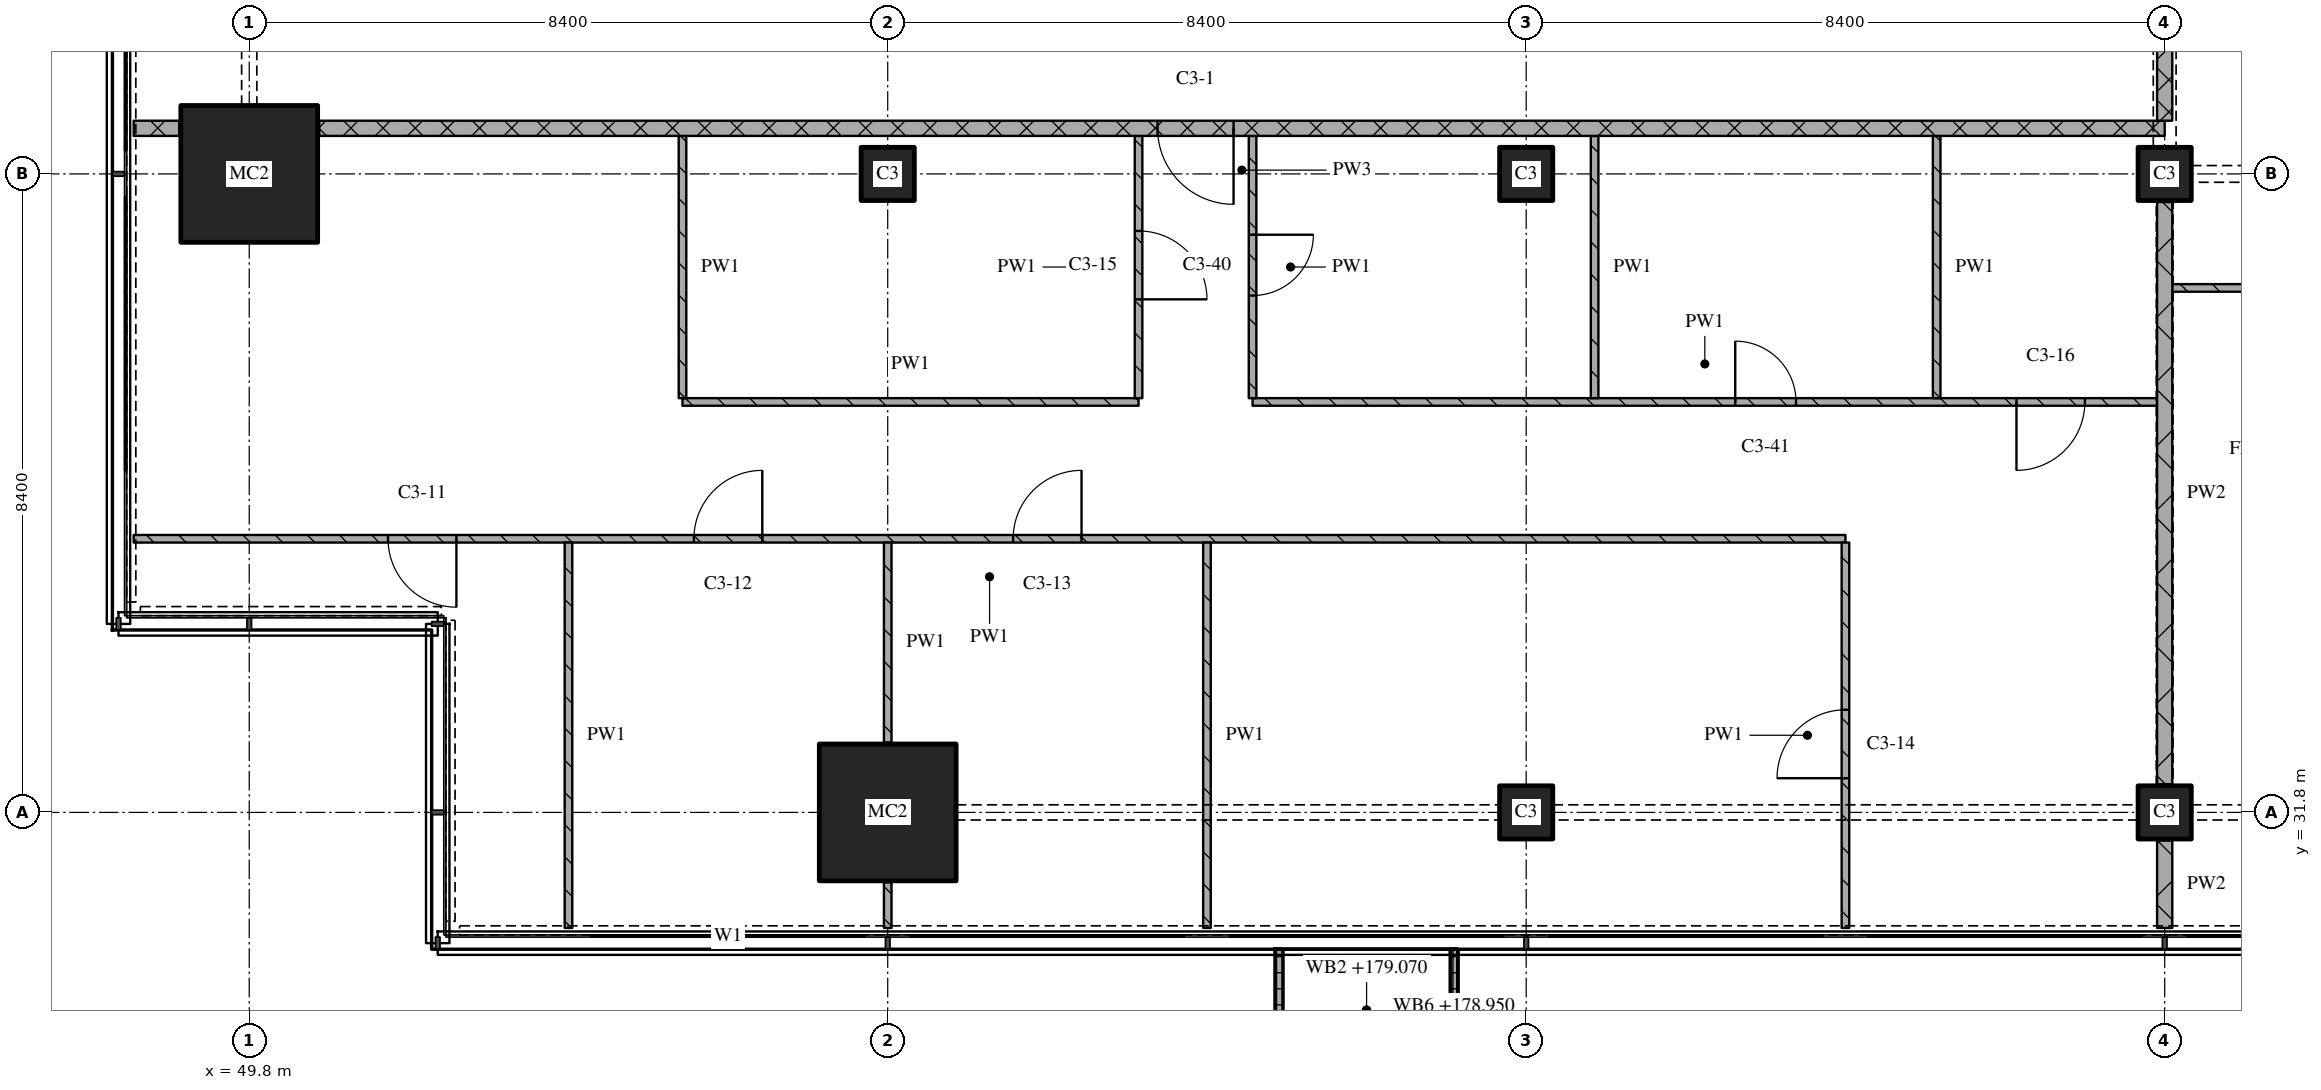
"""IFC4 building model, lengths in metres.
Left out: names, types, materials, properties, quantities, classifications, styles, units other than length and angle.
Written with IfcOpenShell. Run it as: python <this file> out.ifc"""

import sys

from ifc_helpers import new_model, si_unit, direction, frame, frame_2d, origin, origin_2d, place, context, subcontext, project, spatial, polyline, rectangle, outline, extrude, element, fill, save


model = new_model("IFC4")
c1 = context("Model", 3, precision=1e-05, world=origin(), true_north=direction((0.0, 1.0)))
c2 = subcontext(c1, "Body", "Model", "MODEL_VIEW")
j1 = project(units=[si_unit("LENGTHUNIT", "METRE"), si_unit("PLANEANGLEUNIT", "RADIAN")], contexts=[c1])
p1 = place(None, origin())
s1 = spatial("IfcSite", under=j1, at=p1, CompositionType="ELEMENT")
p2 = place(p1, origin())
s2 = spatial("IfcBuilding", under=s1, at=p2, CompositionType="ELEMENT")
p3 = place(p2, frame((0.0, 0.0, 176.25)))
s3 = spatial("IfcBuildingStorey", under=s2, at=p3, CompositionType="ELEMENT", Elevation=176.25)
for number, where, z_axis, x_axis in (
    (1, (49.8, 40.2, 0.0), (0.0, 0.0, 1.0), (1.0, 0.0, 0.0)),
    (2, (58.2, 31.8, 0.0), (0.0, 0.0, 1.0), (1.0, 0.0, 0.0)),
):
    element("IfcColumn", number, at=place(p3, frame(where, z_axis=z_axis, x_axis=x_axis)), inside=s3, PredefinedType="COLUMN", context=c2, shape_type="SweptSolid", body=[
        extrude(rectangle(XDim=1.8, YDim=1.8, at=origin_2d()), origin(), (0.0, 0.0, 1.0), 3.6),
    ])
for number, where, z_axis, x_axis in (
    (3, (58.2, 40.2, 0.0), (0.0, 0.0, 1.0), (1.0, 0.0, 0.0)),
    (4, (66.6, 31.8, 0.0), (0.0, 0.0, 1.0), (1.0, 0.0, 0.0)),
    (5, (66.6, 40.2, 0.0), (0.0, 0.0, 1.0), (1.0, 0.0, 0.0)),
    (6, (75.0, 31.8, 0.0), (0.0, 0.0, 1.0), (1.0, 0.0, 0.0)),
    (7, (75.0, 40.2, 0.0), (0.0, 0.0, 1.0), (1.0, 0.0, 0.0)),
):
    element("IfcColumn", number, at=place(p3, frame(where, z_axis=z_axis, x_axis=x_axis)), inside=s3, PredefinedType="COLUMN", context=c2, shape_type="SweptSolid", body=[
        extrude(rectangle(XDim=0.7, YDim=0.7, at=origin_2d()), origin(), (0.0, 0.0, 1.0), 3.6),
    ])
p4 = place(p3, origin())
e8 = element("IfcWall", 8, at=p4, inside=s3, PredefinedType="SOLIDWALL", context=c2, shape_type="SweptSolid", body=[
    extrude(outline(polyline([(63.3, 30.0), (63.4, 30.0), (63.4, 28.5), (65.6, 28.5), (65.6, 30.0), (65.7, 30.0), (65.7, 28.4), (63.3, 28.4), (63.3, 30.0)])), origin(), (0.0, 0.0, 1.0), 1.0),
])
p5 = place(p3, frame((70.8, 35.4, 0.0), z_axis=(0.0, 0.0, 1.0), x_axis=(-1.0, 0.0, 0.0)))
e9 = element("IfcWall", 9, at=p5, inside=s3, PredefinedType="PARTITIONING", context=c2, shape_type="SweptSolid", body=[
    extrude(rectangle(XDim=22.52, YDim=0.1, at=frame_2d((11.26, 0.0))), origin(), (0.0, 0.0, 1.0), 3.32),
])
p6 = place(p5, frame((10.05, 0.0, 0.0)))
e10 = element("IfcOpeningElement", 10, at=p6, cuts=e9, PredefinedType="OPENING", context=c2, shape_type="SweptSolid", body=[
    extrude(rectangle(XDim=0.9, YDim=2.1, at=frame_2d((0.45, 1.05))), frame((0.0, 0.06, 0.0), z_axis=(0.0, -1.0, 0.0), x_axis=(1.0, 0.0, 0.0)), (0.0, 0.0, 1.0), 0.12),
])
p7 = place(p5, frame((14.25, 0.0, 0.0)))
e11 = element("IfcOpeningElement", 11, at=p7, cuts=e9, PredefinedType="OPENING", context=c2, shape_type="SweptSolid", body=[
    extrude(rectangle(XDim=0.9, YDim=2.1, at=frame_2d((0.45, 1.05))), frame((0.0, 0.06, 0.0), z_axis=(0.0, -1.0, 0.0), x_axis=(1.0, 0.0, 0.0)), (0.0, 0.0, 1.0), 0.12),
])
p8 = place(p5, frame((18.274, 0.0, 0.0)))
e12 = element("IfcOpeningElement", 12, at=p8, cuts=e9, PredefinedType="OPENING", context=c2, shape_type="SweptSolid", body=[
    extrude(rectangle(XDim=0.9, YDim=2.1, at=frame_2d((0.45, 1.05))), frame((0.0, 0.06, 0.0), z_axis=(0.0, -1.0, 0.0), x_axis=(1.0, 0.0, 0.0)), (0.0, 0.0, 1.0), 0.12),
])
p9 = place(p3, frame((55.5, 37.2, 0.0), z_axis=(0.0, 0.0, 1.0), x_axis=(1.0, 0.0, 0.0)))
e13 = element("IfcWall", 13, at=p9, inside=s3, PredefinedType="PARTITIONING", context=c2, shape_type="SweptSolid", body=[
    extrude(rectangle(XDim=6.0, YDim=0.1, at=frame_2d((3.0, 0.0))), origin(), (0.0, 0.0, 1.0), 3.32),
])
p10 = place(p3, frame((63.0, 37.2, 0.0), z_axis=(0.0, 0.0, 1.0), x_axis=(1.0, 0.0, 0.0)))
e14 = element("IfcWall", 14, at=p10, inside=s3, PredefinedType="PARTITIONING", context=c2, shape_type="SweptSolid", body=[
    extrude(rectangle(XDim=11.9, YDim=0.1, at=frame_2d((5.95, 0.0))), origin(), (0.0, 0.0, 1.0), 3.32),
])
p11 = place(p10, frame((6.35, 0.0, 0.0)))
e15 = element("IfcOpeningElement", 15, at=p11, cuts=e14, PredefinedType="OPENING", context=c2, shape_type="SweptSolid", body=[
    extrude(rectangle(XDim=0.8, YDim=2.1, at=frame_2d((0.4, 1.05))), frame((0.0, 0.06, 0.0), z_axis=(0.0, -1.0, 0.0), x_axis=(1.0, 0.0, 0.0)), (0.0, 0.0, 1.0), 0.12),
])
p12 = place(p10, frame((10.05, 0.0, 0.0)))
e16 = element("IfcOpeningElement", 16, at=p12, cuts=e14, PredefinedType="OPENING", context=c2, shape_type="SweptSolid", body=[
    extrude(rectangle(XDim=0.9, YDim=2.1, at=frame_2d((0.45, 1.05))), frame((0.0, 0.06, 0.0), z_axis=(0.0, -1.0, 0.0), x_axis=(1.0, 0.0, 0.0)), (0.0, 0.0, 1.0), 0.12),
])
p13 = place(p3, frame((75.1, 38.7, 0.0), z_axis=(0.0, 0.0, 1.0), x_axis=(1.0, 0.0, 0.0)))
e17 = element("IfcWall", 17, at=p13, inside=s3, PredefinedType="PARTITIONING", context=c2, shape_type="SweptSolid", body=[
    extrude(rectangle(XDim=6.8, YDim=0.1, at=frame_2d((3.4, 0.0))), origin(), (0.0, 0.0, 1.0), 3.32),
])
p14 = place(p13, frame((1.75, 0.0, 0.0)))
e18 = element("IfcOpeningElement", 18, at=p14, cuts=e17, PredefinedType="OPENING", context=c2, shape_type="SweptSolid", body=[
    extrude(rectangle(XDim=0.8, YDim=2.1, at=frame_2d((0.4, 1.05))), frame((0.0, 0.06, 0.0), z_axis=(0.0, -1.0, 0.0), x_axis=(1.0, 0.0, 0.0)), (0.0, 0.0, 1.0), 0.12),
])
p15 = place(p13, frame((5.2, 0.0, 0.0)))
e19 = element("IfcOpeningElement", 19, at=p15, cuts=e17, PredefinedType="OPENING", context=c2, shape_type="SweptSolid", body=[
    extrude(rectangle(XDim=0.8, YDim=2.1, at=frame_2d((0.4, 1.05))), frame((0.0, 0.06, 0.0), z_axis=(0.0, -1.0, 0.0), x_axis=(1.0, 0.0, 0.0)), (0.0, 0.0, 1.0), 0.12),
])
p16 = place(p3, frame((48.28, 40.8, 0.0), z_axis=(0.0, 0.0, 1.0), x_axis=(1.0, 0.0, 0.0)))
e20 = element("IfcWall", 20, at=p16, inside=s3, PredefinedType="PARTITIONING", context=c2, shape_type="SweptSolid", body=[
    extrude(rectangle(XDim=0.6, YDim=0.2, at=frame_2d((0.3, 0.0))), origin(), (0.0, 0.0, 1.0), 3.32),
])
p17 = place(p3, frame((75.0, 40.8, 0.0), z_axis=(0.0, 0.0, 1.0), x_axis=(-1.0, 0.0, 0.0)))
e21 = element("IfcWall", 21, at=p17, inside=s3, PredefinedType="PARTITIONING", context=c2, shape_type="SweptSolid", body=[
    extrude(rectangle(XDim=24.28, YDim=0.2, at=frame_2d((12.14, 0.0))), origin(), (0.0, 0.0, 1.0), 3.32),
])
p18 = place(p17, frame((12.25, 0.0, 0.0)))
e22 = element("IfcOpeningElement", 22, at=p18, cuts=e21, PredefinedType="OPENING", context=c2, shape_type="SweptSolid", body=[
    extrude(rectangle(XDim=1.0, YDim=2.1, at=frame_2d((0.5, 1.05))), frame((0.0, 0.11, 0.0), z_axis=(0.0, -1.0, 0.0), x_axis=(1.0, 0.0, 0.0)), (0.0, 0.0, 1.0), 0.22),
])
p19 = place(p3, frame((54.0, 35.35, 0.0), z_axis=(0.0, 0.0, 1.0), x_axis=(0.0, -1.0, 0.0)))
e23 = element("IfcWall", 23, at=p19, inside=s3, PredefinedType="PARTITIONING", context=c2, shape_type="SweptSolid", body=[
    extrude(rectangle(XDim=5.07, YDim=0.1, at=frame_2d((2.535, 0.0))), origin(), (0.0, 0.0, 1.0), 3.32),
])
p20 = place(p3, frame((55.5, 40.7, 0.0), z_axis=(0.0, 0.0, 1.0), x_axis=(0.0, -1.0, 0.0)))
e24 = element("IfcWall", 24, at=p20, inside=s3, PredefinedType="PARTITIONING", context=c2, shape_type="SweptSolid", body=[
    extrude(rectangle(XDim=3.45, YDim=0.1, at=frame_2d((1.725, 0.0))), origin(), (0.0, 0.0, 1.0), 3.32),
])
p21 = place(p3, frame((58.2, 30.88, 0.0), z_axis=(0.0, 0.0, 1.0), x_axis=(0.0, -1.0, 0.0)))
e25 = element("IfcWall", 25, at=p21, inside=s3, PredefinedType="PARTITIONING", context=c2, shape_type="SweptSolid", body=[
    extrude(rectangle(XDim=0.6, YDim=0.1, at=frame_2d((0.3, 0.0))), origin(), (0.0, 0.0, 1.0), 3.32),
])
p22 = place(p3, frame((58.2, 35.35, 0.0), z_axis=(0.0, 0.0, 1.0), x_axis=(0.0, -1.0, 0.0)))
e26 = element("IfcWall", 26, at=p22, inside=s3, PredefinedType="PARTITIONING", context=c2, shape_type="SweptSolid", body=[
    extrude(rectangle(XDim=2.63, YDim=0.1, at=frame_2d((1.315, 0.0))), origin(), (0.0, 0.0, 1.0), 3.32),
])
p23 = place(p3, frame((61.5, 37.25, 0.0), z_axis=(0.0, 0.0, 1.0), x_axis=(0.0, 1.0, 0.0)))
e27 = element("IfcWall", 27, at=p23, inside=s3, PredefinedType="PARTITIONING", context=c2, shape_type="SweptSolid", body=[
    extrude(rectangle(XDim=3.45, YDim=0.1, at=frame_2d((1.725, 0.0))), origin(), (0.0, 0.0, 1.0), 3.32),
])
p24 = place(p23, frame((1.3, 0.0, 0.0)))
e28 = element("IfcOpeningElement", 28, at=p24, cuts=e27, PredefinedType="OPENING", context=c2, shape_type="SweptSolid", body=[
    extrude(rectangle(XDim=0.9, YDim=2.1, at=frame_2d((0.45, 1.05))), frame((0.0, 0.06, 0.0), z_axis=(0.0, -1.0, 0.0), x_axis=(1.0, 0.0, 0.0)), (0.0, 0.0, 1.0), 0.12),
])
p25 = place(p3, frame((62.4, 35.35, 0.0), z_axis=(0.0, 0.0, 1.0), x_axis=(0.0, -1.0, 0.0)))
e29 = element("IfcWall", 29, at=p25, inside=s3, PredefinedType="PARTITIONING", context=c2, shape_type="SweptSolid", body=[
    extrude(rectangle(XDim=5.07, YDim=0.1, at=frame_2d((2.535, 0.0))), origin(), (0.0, 0.0, 1.0), 3.32),
])
p26 = place(p3, frame((63.0, 40.7, 0.0), z_axis=(0.0, 0.0, 1.0), x_axis=(0.0, -1.0, 0.0)))
e30 = element("IfcWall", 30, at=p26, inside=s3, PredefinedType="PARTITIONING", context=c2, shape_type="SweptSolid", body=[
    extrude(rectangle(XDim=3.45, YDim=0.1, at=frame_2d((1.725, 0.0))), origin(), (0.0, 0.0, 1.0), 3.32),
])
p27 = place(p26, frame((1.3, 0.0, 0.0)))
e31 = element("IfcOpeningElement", 31, at=p27, cuts=e30, PredefinedType="OPENING", context=c2, shape_type="SweptSolid", body=[
    extrude(rectangle(XDim=0.8, YDim=2.1, at=frame_2d((0.4, 1.05))), frame((0.0, 0.06, 0.0), z_axis=(0.0, -1.0, 0.0), x_axis=(1.0, 0.0, 0.0)), (0.0, 0.0, 1.0), 0.12),
])
p28 = place(p3, frame((67.5, 40.7, 0.0), z_axis=(0.0, 0.0, 1.0), x_axis=(0.0, -1.0, 0.0)))
e32 = element("IfcWall", 32, at=p28, inside=s3, PredefinedType="PARTITIONING", context=c2, shape_type="SweptSolid", body=[
    extrude(rectangle(XDim=3.45, YDim=0.1, at=frame_2d((1.725, 0.0))), origin(), (0.0, 0.0, 1.0), 3.32),
])
p29 = place(p3, frame((70.8, 30.28, 0.0), z_axis=(0.0, 0.0, 1.0), x_axis=(0.0, 1.0, 0.0)))
e33 = element("IfcWall", 33, at=p29, inside=s3, PredefinedType="PARTITIONING", context=c2, shape_type="SweptSolid", body=[
    extrude(rectangle(XDim=5.07, YDim=0.1, at=frame_2d((2.535, 0.0))), origin(), (0.0, 0.0, 1.0), 3.32),
])
p30 = place(p29, frame((1.97, 0.0, 0.0)))
e34 = element("IfcOpeningElement", 34, at=p30, cuts=e33, PredefinedType="OPENING", context=c2, shape_type="SweptSolid", body=[
    extrude(rectangle(XDim=0.9, YDim=2.1, at=frame_2d((0.45, 1.05))), frame((0.0, 0.06, 0.0), z_axis=(0.0, -1.0, 0.0), x_axis=(1.0, 0.0, 0.0)), (0.0, 0.0, 1.0), 0.12),
])
p31 = place(p3, frame((72.0, 40.7, 0.0), z_axis=(0.0, 0.0, 1.0), x_axis=(0.0, -1.0, 0.0)))
e35 = element("IfcWall", 35, at=p31, inside=s3, PredefinedType="PARTITIONING", context=c2, shape_type="SweptSolid", body=[
    extrude(rectangle(XDim=3.45, YDim=0.1, at=frame_2d((1.725, 0.0))), origin(), (0.0, 0.0, 1.0), 3.32),
])
p32 = place(p3, frame((75.0, 43.1, 0.0), z_axis=(0.0, 0.0, 1.0), x_axis=(0.0, -1.0, 0.0)))
e36 = element("IfcWall", 36, at=p32, inside=s3, PredefinedType="PARTITIONING", context=c2, shape_type="SweptSolid", body=[
    extrude(rectangle(XDim=2.2, YDim=0.2, at=frame_2d((1.1, 0.0))), origin(), (0.0, 0.0, 1.0), 2.43),
])
p33 = place(p3, frame((75.0, 31.43, 0.0), z_axis=(0.0, 0.0, 1.0), x_axis=(0.0, -1.0, 0.0)))
e37 = element("IfcWall", 37, at=p33, inside=s3, PredefinedType="PARTITIONING", context=c2, shape_type="SweptSolid", body=[
    extrude(rectangle(XDim=1.15, YDim=0.2, at=frame_2d((0.575, 0.0))), origin(), (0.0, 0.0, 1.0), 3.32),
])
p34 = place(p3, frame((75.0, 39.83, 0.0), z_axis=(0.0, 0.0, 1.0), x_axis=(0.0, -1.0, 0.0)))
e38 = element("IfcWall", 38, at=p34, inside=s3, PredefinedType="PARTITIONING", context=c2, shape_type="SweptSolid", body=[
    extrude(rectangle(XDim=7.66, YDim=0.2, at=frame_2d((3.83, 0.0))), origin(), (0.0, 0.0, 1.0), 2.72),
])
p35 = place(p6, origin())
e39 = element("IfcDoor", 39, at=p35, inside=s3, OperationType="SINGLE_SWING_RIGHT", PredefinedType="DOOR", context=c2, shape_type="SweptSolid", body=[
    extrude(rectangle(XDim=0.9, YDim=2.1, at=frame_2d((0.45, 1.05))), frame((0.0, 0.025, 0.0), z_axis=(0.0, -1.0, 0.0), x_axis=(1.0, 0.0, 0.0)), (0.0, 0.0, 1.0), 0.05),
])
fill(e10, e39)
p36 = place(p7, origin())
e40 = element("IfcDoor", 40, at=p36, inside=s3, OperationType="SINGLE_SWING_RIGHT", PredefinedType="DOOR", context=c2, shape_type="SweptSolid", body=[
    extrude(rectangle(XDim=0.9, YDim=2.1, at=frame_2d((0.45, 1.05))), frame((0.0, 0.025, 0.0), z_axis=(0.0, -1.0, 0.0), x_axis=(1.0, 0.0, 0.0)), (0.0, 0.0, 1.0), 0.05),
])
fill(e11, e40)
p37 = place(p8, origin())
e41 = element("IfcDoor", 41, at=p37, inside=s3, OperationType="SINGLE_SWING_LEFT", PredefinedType="DOOR", context=c2, shape_type="SweptSolid", body=[
    extrude(rectangle(XDim=0.9, YDim=2.1, at=frame_2d((0.45, 1.05))), frame((0.0, 0.025, 0.0), z_axis=(0.0, -1.0, 0.0), x_axis=(1.0, 0.0, 0.0)), (0.0, 0.0, 1.0), 0.05),
])
fill(e12, e41)
p38 = place(p11, origin())
e42 = element("IfcDoor", 42, at=p38, inside=s3, OperationType="SINGLE_SWING_LEFT", PredefinedType="DOOR", context=c2, shape_type="SweptSolid", body=[
    extrude(rectangle(XDim=0.8, YDim=2.1, at=frame_2d((0.4, 1.05))), frame((0.0, 0.025, 0.0), z_axis=(0.0, -1.0, 0.0), x_axis=(1.0, 0.0, 0.0)), (0.0, 0.0, 1.0), 0.05),
])
fill(e15, e42)
p39 = place(p12, origin())
e43 = element("IfcDoor", 43, at=p39, inside=s3, OperationType="SINGLE_SWING_RIGHT", PredefinedType="DOOR", context=c2, shape_type="SweptSolid", body=[
    extrude(rectangle(XDim=0.9, YDim=2.1, at=frame_2d((0.45, 1.05))), frame((0.0, 0.025, 0.0), z_axis=(0.0, -1.0, 0.0), x_axis=(1.0, 0.0, 0.0)), (0.0, 0.0, 1.0), 0.05),
])
fill(e16, e43)
p40 = place(p18, origin())
e44 = element("IfcDoor", 44, at=p40, inside=s3, OperationType="SINGLE_SWING_LEFT", PredefinedType="DOOR", context=c2, shape_type="SweptSolid", body=[
    extrude(rectangle(XDim=1.0, YDim=2.1, at=frame_2d((0.5, 1.05))), frame((0.0, 0.025, 0.0), z_axis=(0.0, -1.0, 0.0), x_axis=(1.0, 0.0, 0.0)), (0.0, 0.0, 1.0), 0.05),
])
fill(e22, e44)
p41 = place(p24, origin())
e45 = element("IfcDoor", 45, at=p41, inside=s3, OperationType="SINGLE_SWING_RIGHT", PredefinedType="DOOR", context=c2, shape_type="SweptSolid", body=[
    extrude(rectangle(XDim=0.9, YDim=2.1, at=frame_2d((0.45, 1.05))), frame((0.0, 0.025, 0.0), z_axis=(0.0, -1.0, 0.0), x_axis=(1.0, 0.0, 0.0)), (0.0, 0.0, 1.0), 0.05),
])
fill(e28, e45)
p42 = place(p27, origin())
e46 = element("IfcDoor", 46, at=p42, inside=s3, OperationType="SINGLE_SWING_LEFT", PredefinedType="DOOR", context=c2, shape_type="SweptSolid", body=[
    extrude(rectangle(XDim=0.8, YDim=2.1, at=frame_2d((0.4, 1.05))), frame((0.0, 0.025, 0.0), z_axis=(0.0, -1.0, 0.0), x_axis=(1.0, 0.0, 0.0)), (0.0, 0.0, 1.0), 0.05),
])
fill(e31, e46)
p43 = place(p30, origin())
e47 = element("IfcDoor", 47, at=p43, inside=s3, OperationType="SINGLE_SWING_LEFT", PredefinedType="DOOR", context=c2, shape_type="SweptSolid", body=[
    extrude(rectangle(XDim=0.9, YDim=2.1, at=frame_2d((0.45, 1.05))), frame((0.0, 0.025, 0.0), z_axis=(0.0, -1.0, 0.0), x_axis=(1.0, 0.0, 0.0)), (0.0, 0.0, 1.0), 0.05),
])
fill(e34, e47)
save(model, sys.argv[1])
